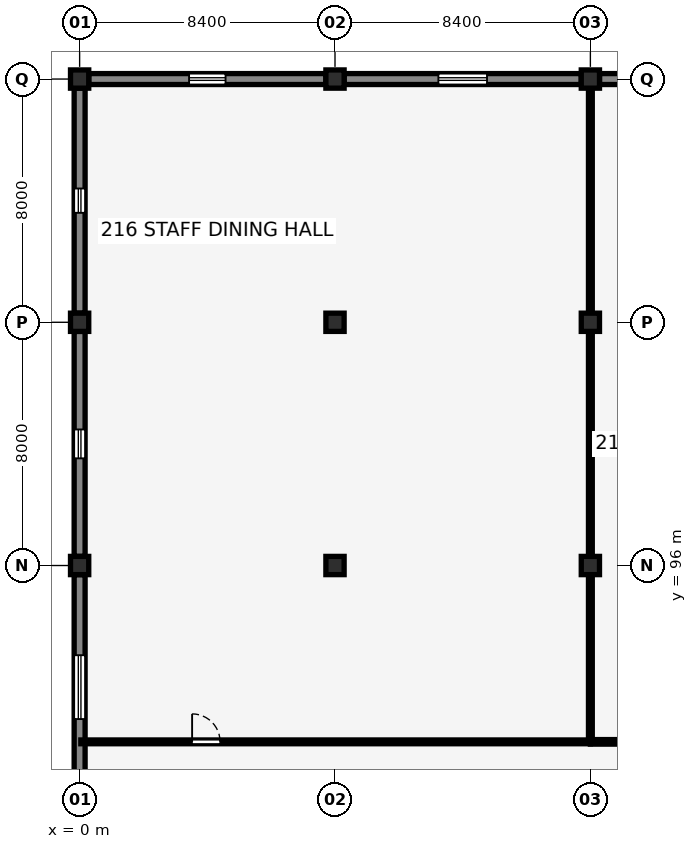
"""IFC4 building model, lengths in metres.
Left out: names, types, materials, properties, quantities, classifications, styles, units other than length and angle.
Written with IfcOpenShell. Run it as: python <this file> out.ifc"""

import sys

from ifc_helpers import new_model, si_unit, direction, frame, frame_2d, origin, origin_2d, place, context, subcontext, project, spatial, rectangle, extrude, element, fill, save


model = new_model("IFC4")
c1 = context("Model", 3, precision=1e-05, world=origin(), true_north=direction((0.0, 1.0)))
c2 = subcontext(c1, "Body", "Model", "MODEL_VIEW")
j1 = project(units=[si_unit("LENGTHUNIT", "METRE"), si_unit("PLANEANGLEUNIT", "RADIAN")], contexts=[c1])
p1 = place(None, origin())
s1 = spatial("IfcSite", under=j1, at=p1, CompositionType="ELEMENT")
p2 = place(p1, origin())
s2 = spatial("IfcBuilding", under=s1, at=p2, CompositionType="ELEMENT")
p3 = place(p2, frame((0.0, 0.0, 9.52)))
s3 = spatial("IfcBuildingStorey", under=s2, at=p3, CompositionType="ELEMENT", Elevation=9.52)
for number, where, z_axis, x_axis in (
    (1, (0.0, 96.0, 0.0), (0.0, 0.0, 1.0), (1.0, 0.0, 0.0)),
    (2, (0.0, 104.0, 0.0), (0.0, 0.0, 1.0), (1.0, 0.0, 0.0)),
    (3, (0.0, 112.0, 0.0), (0.0, 0.0, 1.0), (1.0, 0.0, 0.0)),
    (4, (8.4, 96.0, 0.0), (0.0, 0.0, 1.0), (1.0, 0.0, 0.0)),
    (5, (8.4, 104.0, 0.0), (0.0, 0.0, 1.0), (1.0, 0.0, 0.0)),
    (6, (8.4, 112.0, 0.0), (0.0, 0.0, 1.0), (1.0, 0.0, 0.0)),
    (7, (16.8, 96.0, 0.0), (0.0, 0.0, 1.0), (1.0, 0.0, 0.0)),
    (8, (16.8, 104.0, 0.0), (0.0, 0.0, 1.0), (1.0, 0.0, 0.0)),
    (9, (16.8, 112.0, 0.0), (0.0, 0.0, 1.0), (1.0, 0.0, 0.0)),
):
    element("IfcColumn", number, at=place(p3, frame(where, z_axis=z_axis, x_axis=x_axis)), inside=s3, PredefinedType="COLUMN", context=c2, shape_type="SweptSolid", body=[
        extrude(rectangle(XDim=0.6, YDim=0.6, at=origin_2d()), origin(), (0.0, 0.0, 1.0), 3.57),
    ])
p4 = place(p3, frame((0.0, 88.3, 0.0), z_axis=(0.0, 0.0, 1.0), x_axis=(0.0, 1.0, 0.0)))
e10 = element("IfcWall", 10, at=p4, inside=s3, PredefinedType="SOLIDWALL", context=c2, shape_type="SweptSolid", body=[
    extrude(rectangle(XDim=7.4, YDim=0.36, at=frame_2d((3.7, 0.0))), origin(), (0.0, 0.0, 1.0), 3.219),
])
p5 = place(p4, frame((2.65, 0.0, 1.55), z_axis=(0.0, 0.0, 1.0), x_axis=(1.0, 0.0, 0.0)))
e11 = element("IfcOpeningElement", 11, at=p5, cuts=e10, PredefinedType="OPENING", context=c2, shape_type="SweptSolid", body=[
    extrude(rectangle(XDim=2.1, YDim=0.8, at=frame_2d((1.05, 0.4))), frame((0.0, 0.19, 0.0), z_axis=(0.0, -1.0, 0.0), x_axis=(1.0, 0.0, 0.0)), (0.0, 0.0, 1.0), 0.38),
])
p6 = place(p3, frame((0.0, 96.3, 0.0), z_axis=(0.0, 0.0, 1.0), x_axis=(0.0, 1.0, 0.0)))
e12 = element("IfcWall", 12, at=p6, inside=s3, PredefinedType="SOLIDWALL", context=c2, shape_type="SweptSolid", body=[
    extrude(rectangle(XDim=7.4, YDim=0.36, at=frame_2d((3.7, 0.0))), origin(), (0.0, 0.0, 1.0), 3.219),
])
p7 = place(p6, frame((3.225, 0.0, 0.65), z_axis=(0.0, 0.0, 1.0), x_axis=(1.0, 0.0, 0.0)))
e13 = element("IfcOpeningElement", 13, at=p7, cuts=e12, PredefinedType="OPENING", context=c2, shape_type="SweptSolid", body=[
    extrude(rectangle(XDim=0.95, YDim=2.1, at=frame_2d((0.475, 1.05))), frame((0.0, 0.19, 0.0), z_axis=(0.0, -1.0, 0.0), x_axis=(1.0, 0.0, 0.0)), (0.0, 0.0, 1.0), 0.38),
])
p8 = place(p3, frame((0.0, 104.3, 0.0), z_axis=(0.0, 0.0, 1.0), x_axis=(0.0, 1.0, 0.0)))
e14 = element("IfcWall", 14, at=p8, inside=s3, PredefinedType="SOLIDWALL", context=c2, shape_type="SweptSolid", body=[
    extrude(rectangle(XDim=7.4, YDim=0.36, at=frame_2d((3.7, 0.0))), origin(), (0.0, 0.0, 1.0), 3.219),
])
p9 = place(p8, frame((3.3, 0.0, 0.65), z_axis=(0.0, 0.0, 1.0), x_axis=(1.0, 0.0, 0.0)))
e15 = element("IfcOpeningElement", 15, at=p9, cuts=e14, PredefinedType="OPENING", context=c2, shape_type="SweptSolid", body=[
    extrude(rectangle(XDim=0.8, YDim=1.85, at=frame_2d((0.4, 0.925))), frame((0.0, 0.19, 0.0), z_axis=(0.0, -1.0, 0.0), x_axis=(1.0, 0.0, 0.0)), (0.0, 0.0, 1.0), 0.38),
])
p10 = place(p3, frame((0.3, 112.0, 0.0), z_axis=(0.0, 0.0, 1.0), x_axis=(1.0, 0.0, 0.0)))
e16 = element("IfcWall", 16, at=p10, inside=s3, PredefinedType="SOLIDWALL", context=c2, shape_type="SweptSolid", body=[
    extrude(rectangle(XDim=7.8, YDim=0.36, at=frame_2d((3.9, 0.0))), origin(), (0.0, 0.0, 1.0), 3.27),
])
p11 = place(p10, frame((3.3, 0.0, 1.55), z_axis=(0.0, 0.0, 1.0), x_axis=(1.0, 0.0, 0.0)))
e17 = element("IfcOpeningElement", 17, at=p11, cuts=e16, PredefinedType="OPENING", context=c2, shape_type="SweptSolid", body=[
    extrude(rectangle(XDim=1.2, YDim=0.95, at=frame_2d((0.6, 0.475))), frame((0.0, 0.19, 0.0), z_axis=(0.0, -1.0, 0.0), x_axis=(1.0, 0.0, 0.0)), (0.0, 0.0, 1.0), 0.38),
])
p12 = place(p3, frame((8.7, 112.0, 0.0), z_axis=(0.0, 0.0, 1.0), x_axis=(1.0, 0.0, 0.0)))
e18 = element("IfcWall", 18, at=p12, inside=s3, PredefinedType="SOLIDWALL", context=c2, shape_type="SweptSolid", body=[
    extrude(rectangle(XDim=7.8, YDim=0.36, at=frame_2d((3.9, 0.0))), origin(), (0.0, 0.0, 1.0), 3.27),
])
p13 = place(p12, frame((3.1, 0.0, 0.9), z_axis=(0.0, 0.0, 1.0), x_axis=(1.0, 0.0, 0.0)))
e19 = element("IfcOpeningElement", 19, at=p13, cuts=e18, PredefinedType="OPENING", context=c2, shape_type="SweptSolid", body=[
    extrude(rectangle(XDim=1.6, YDim=1.2, at=frame_2d((0.8, 0.6))), frame((0.0, 0.19, 0.0), z_axis=(0.0, -1.0, 0.0), x_axis=(1.0, 0.0, 0.0)), (0.0, 0.0, 1.0), 0.38),
])
p14 = place(p3, frame((17.1, 112.0, 0.0), z_axis=(0.0, 0.0, 1.0), x_axis=(1.0, 0.0, 0.0)))
e20 = element("IfcWall", 20, at=p14, inside=s3, PredefinedType="SOLIDWALL", context=c2, shape_type="SweptSolid", body=[
    extrude(rectangle(XDim=7.8, YDim=0.36, at=frame_2d((3.9, 0.0))), origin(), (0.0, 0.0, 1.0), 3.27),
])
p15 = place(p14, frame((2.1, 0.0, 0.9), z_axis=(0.0, 0.0, 1.0), x_axis=(1.0, 0.0, 0.0)))
e21 = element("IfcOpeningElement", 21, at=p15, cuts=e20, PredefinedType="OPENING", context=c2, shape_type="SweptSolid", body=[
    extrude(rectangle(XDim=3.6, YDim=1.8, at=frame_2d((1.8, 0.9))), frame((0.0, 0.19, 0.0), z_axis=(0.0, -1.0, 0.0), x_axis=(1.0, 0.0, 0.0)), (0.0, 0.0, 1.0), 0.38),
])
p16 = place(p3, frame((0.04, 90.2, 0.0), z_axis=(0.0, 0.0, 1.0), x_axis=(1.0, 0.0, 0.0)))
e22 = element("IfcWall", 22, at=p16, inside=s3, PredefinedType="PARTITIONING", context=c2, shape_type="SweptSolid", body=[
    extrude(rectangle(XDim=16.76, YDim=0.125, at=frame_2d((8.38, 0.0))), origin(), (0.0, 0.0, 1.0), 3.107),
])
p17 = place(p16, frame((3.66, 0.0, 0.0), z_axis=(0.0, 0.0, 1.0), x_axis=(1.0, 0.0, 0.0)))
e23 = element("IfcOpeningElement", 23, at=p17, cuts=e22, PredefinedType="OPENING", context=c2, shape_type="SweptSolid", body=[
    extrude(rectangle(XDim=0.92, YDim=2.12, at=frame_2d((0.46, 1.06))), frame((0.0, 0.073, 0.0), z_axis=(0.0, -1.0, 0.0), x_axis=(1.0, 0.0, 0.0)), (0.0, 0.0, 1.0), 0.145),
])
p18 = place(p3, frame((16.8, 90.2, 0.0), z_axis=(0.0, 0.0, 1.0), x_axis=(1.0, 0.0, 0.0)))
e24 = element("IfcWall", 24, at=p18, inside=s3, PredefinedType="PARTITIONING", context=c2, shape_type="SweptSolid", body=[
    extrude(rectangle(XDim=8.4, YDim=0.15, at=frame_2d((4.2, 0.0))), origin(), (0.0, 0.0, 1.0), 3.57),
])
p19 = place(p18, frame((3.7, 0.0, 0.0), z_axis=(0.0, 0.0, 1.0), x_axis=(1.0, 0.0, 0.0)))
e25 = element("IfcOpeningElement", 25, at=p19, cuts=e24, PredefinedType="OPENING", context=c2, shape_type="SweptSolid", body=[
    extrude(rectangle(XDim=1.08, YDim=2.18, at=frame_2d((0.54, 1.09))), frame((0.0, 0.085, 0.0), z_axis=(0.0, -1.0, 0.0), x_axis=(1.0, 0.0, 0.0)), (0.0, 0.0, 1.0), 0.17),
])
p20 = place(p3, frame((16.8, 90.2, 0.0), z_axis=(0.0, 0.0, 1.0), x_axis=(0.0, 1.0, 0.0)))
e26 = element("IfcWall", 26, at=p20, inside=s3, PredefinedType="PARTITIONING", context=c2, shape_type="SweptSolid", body=[
    extrude(rectangle(XDim=5.51, YDim=0.125, at=frame_2d((2.755, 0.0))), origin(), (0.0, 0.0, 1.0), 3.107),
])
for number, where, z_axis, x_axis in (
    (27, (16.8, 96.29, 0.0), (0.0, 0.0, 1.0), (0.0, 1.0, 0.0)),
    (28, (16.8, 104.29, 0.0), (0.0, 0.0, 1.0), (0.0, 1.0, 0.0)),
):
    element("IfcWall", number, at=place(p3, frame(where, z_axis=z_axis, x_axis=x_axis)), inside=s3, PredefinedType="PARTITIONING", context=c2, shape_type="SweptSolid", body=[
        extrude(rectangle(XDim=7.42, YDim=0.125, at=frame_2d((3.71, 0.0))), origin(), (0.0, 0.0, 1.0), 3.107),
    ])
p21 = place(p5, origin())
e29 = element("IfcWindow", 29, at=p21, inside=s3, PartitioningType="DOUBLE_PANEL_HORIZONTAL", PredefinedType="WINDOW", context=c2, shape_type="SweptSolid", body=[
    extrude(rectangle(XDim=2.1, YDim=0.8, at=frame_2d((1.05, 0.4))), frame((0.0, 0.03, 0.0), z_axis=(0.0, -1.0, 0.0), x_axis=(1.0, 0.0, 0.0)), (0.0, 0.0, 1.0), 0.06),
])
fill(e11, e29)
p22 = place(p7, origin())
e30 = element("IfcWindow", 30, at=p22, inside=s3, PartitioningType="SINGLE_PANEL", PredefinedType="WINDOW", context=c2, shape_type="SweptSolid", body=[
    extrude(rectangle(XDim=0.95, YDim=2.1, at=frame_2d((0.475, 1.05))), frame((0.0, 0.03, 0.0), z_axis=(0.0, -1.0, 0.0), x_axis=(1.0, 0.0, 0.0)), (0.0, 0.0, 1.0), 0.06),
])
fill(e13, e30)
p23 = place(p9, origin())
e31 = element("IfcWindow", 31, at=p23, inside=s3, PartitioningType="SINGLE_PANEL", PredefinedType="WINDOW", context=c2, shape_type="SweptSolid", body=[
    extrude(rectangle(XDim=0.8, YDim=1.85, at=frame_2d((0.4, 0.925))), frame((0.0, 0.03, 0.0), z_axis=(0.0, -1.0, 0.0), x_axis=(1.0, 0.0, 0.0)), (0.0, 0.0, 1.0), 0.06),
])
fill(e15, e31)
p24 = place(p11, origin())
e32 = element("IfcWindow", 32, at=p24, inside=s3, PartitioningType="SINGLE_PANEL", PredefinedType="WINDOW", context=c2, shape_type="SweptSolid", body=[
    extrude(rectangle(XDim=1.2, YDim=0.95, at=frame_2d((0.6, 0.475))), frame((0.0, 0.03, 0.0), z_axis=(0.0, -1.0, 0.0), x_axis=(1.0, 0.0, 0.0)), (0.0, 0.0, 1.0), 0.06),
])
fill(e17, e32)
p25 = place(p13, origin())
e33 = element("IfcWindow", 33, at=p25, inside=s3, PartitioningType="DOUBLE_PANEL_VERTICAL", PredefinedType="WINDOW", context=c2, shape_type="SweptSolid", body=[
    extrude(rectangle(XDim=1.6, YDim=1.2, at=frame_2d((0.8, 0.6))), frame((0.0, 0.03, 0.0), z_axis=(0.0, -1.0, 0.0), x_axis=(1.0, 0.0, 0.0)), (0.0, 0.0, 1.0), 0.06),
])
fill(e19, e33)
p26 = place(p17, origin())
e34 = element("IfcDoor", 34, at=p26, inside=s3, OperationType="SINGLE_SWING_LEFT", PredefinedType="DOOR", context=c2, shape_type="SweptSolid", body=[
    extrude(rectangle(XDim=0.92, YDim=2.12, at=frame_2d((0.46, 1.06))), frame((0.0, 0.025, 0.0), z_axis=(0.0, -1.0, 0.0), x_axis=(1.0, 0.0, 0.0)), (0.0, 0.0, 1.0), 0.05),
])
fill(e23, e34)
save(model, sys.argv[1])
